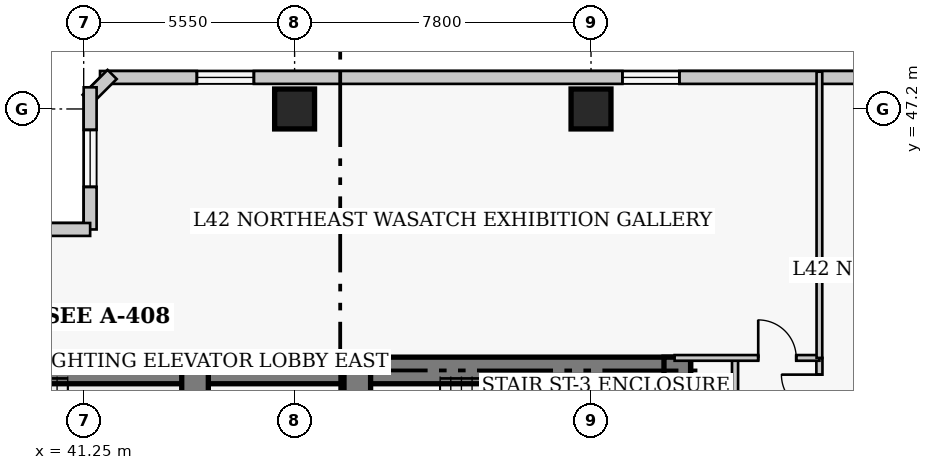
"""IFC4 building model, lengths in metres.
Left out: names, types, materials, properties, quantities, classifications, styles, units other than length and angle.
Written with IfcOpenShell. Run it as: python <this file> out.ifc"""

import sys

from ifc_helpers import new_model, si_unit, direction, frame, frame_2d, origin, origin_2d, place, context, subcontext, project, spatial, rectangle, extrude, element, fill, save


model = new_model("IFC4")
c1 = context("Model", 3, precision=1e-05, world=origin(), true_north=direction((0.0, 1.0)))
c2 = subcontext(c1, "Body", "Model", "MODEL_VIEW")
j1 = project(units=[si_unit("LENGTHUNIT", "METRE"), si_unit("PLANEANGLEUNIT", "RADIAN")], contexts=[c1])
p1 = place(None, origin())
s1 = spatial("IfcSite", under=j1, at=p1, CompositionType="ELEMENT")
p2 = place(p1, origin())
s2 = spatial("IfcBuilding", under=s1, at=p2, CompositionType="ELEMENT")
p3 = place(p2, frame((0.0, 0.0, 168.8)))
s3 = spatial("IfcBuildingStorey", under=s2, at=p3, CompositionType="ELEMENT", Elevation=168.8)
p4 = place(p3, frame((35.85, 40.32, 0.0), z_axis=(0.0, 0.0, 1.0), x_axis=(1.0, 0.0, 0.0)))
e1 = element("IfcWall", 1, at=p4, inside=s3, PredefinedType="SHEAR", context=c2, shape_type="SweptSolid", body=[
    extrude(rectangle(XDim=12.6, YDim=0.7, at=frame_2d((6.3, 0.0))), origin(), (0.0, 0.0, 1.0), 3.8),
])
p5 = place(p3, frame((48.45, 40.32, 0.0), z_axis=(0.0, 0.0, 1.0), x_axis=(1.0, 0.0, 0.0)))
e2 = element("IfcWall", 2, at=p5, inside=s3, PredefinedType="SHEAR", context=c2, shape_type="SweptSolid", body=[
    extrude(rectangle(XDim=8.77, YDim=0.7, at=frame_2d((4.385, 0.0))), origin(), (0.0, 0.0, 1.0), 3.8),
])
p6 = place(p3, frame((56.87, 27.05, 0.0), z_axis=(0.0, 0.0, 1.0), x_axis=(0.0, 1.0, 0.0)))
e3 = element("IfcWall", 3, at=p6, inside=s3, PredefinedType="SHEAR", context=c2, shape_type="SweptSolid", body=[
    extrude(rectangle(XDim=13.62, YDim=0.7, at=frame_2d((6.81, 0.0))), origin(), (0.0, 0.0, 1.0), 3.8),
])
p7 = place(p3, frame((44.18, 36.37, 0.0), z_axis=(0.0, 0.0, 1.0), x_axis=(0.0, 1.0, 0.0)))
e4 = element("IfcWall", 4, at=p7, inside=s3, PredefinedType="SHEAR", context=c2, shape_type="SweptSolid", body=[
    extrude(rectangle(XDim=3.95, YDim=0.7, at=frame_2d((1.975, 0.0))), origin(), (0.0, 0.0, 1.0), 3.8),
])
p8 = place(p3, frame((48.45, 32.4, 0.0), z_axis=(0.0, 0.0, 1.0), x_axis=(0.0, 1.0, 0.0)))
e5 = element("IfcWall", 5, at=p8, inside=s3, PredefinedType="SHEAR", context=c2, shape_type="SweptSolid", body=[
    extrude(rectangle(XDim=7.92, YDim=0.7, at=frame_2d((3.96, 0.0))), origin(), (0.0, 0.0, 1.0), 3.8),
])
p9 = place(p8, frame((5.8, 0.0, 0.0)))
e6 = element("IfcOpeningElement", 6, at=p9, cuts=e5, PredefinedType="OPENING", context=c2, shape_type="SweptSolid", body=[
    extrude(rectangle(XDim=1.1, YDim=2.15, at=frame_2d((0.55, 1.075))), frame((0.0, 0.36, 0.0), z_axis=(0.0, -1.0, 0.0), x_axis=(1.0, 0.0, 0.0)), (0.0, 0.0, 1.0), 0.72),
])
for number, where, z_axis, x_axis in (
    (7, (46.8, 47.2, 0.0), (0.0, 0.0, 1.0), (1.0, 0.0, 0.0)),
    (8, (54.6, 47.2, 0.0), (0.0, 0.0, 1.0), (1.0, 0.0, 0.0)),
):
    element("IfcColumn", number, at=place(p3, frame(where, z_axis=z_axis, x_axis=x_axis)), inside=s3, PredefinedType="COLUMN", context=c2, shape_type="SweptSolid", body=[
        extrude(rectangle(XDim=1.05, YDim=1.05, at=origin_2d()), origin(), (0.0, 0.0, 1.0), 3.8),
    ])
p10 = place(p3, frame((68.37, 48.03, 0.0), z_axis=(0.0, 0.0, 1.0), x_axis=(-1.0, 0.0, 0.0)))
e9 = element("IfcWall", 9, at=p10, inside=s3, PredefinedType="SOLIDWALL", context=c2, shape_type="SweptSolid", body=[
    extrude(rectangle(XDim=26.69, YDim=0.34, at=frame_2d((13.345, 0.0))), origin(), (0.0, 0.0, 1.0), 3.55),
])
p11 = place(p10, frame((3.048, 0.0, 0.85)))
e10 = element("IfcOpeningElement", 10, at=p11, cuts=e9, PredefinedType="OPENING", context=c2, shape_type="SweptSolid", body=[
    extrude(rectangle(XDim=1.5, YDim=1.75, at=frame_2d((0.75, 0.875))), frame((0.0, 0.18, 0.0), z_axis=(0.0, -1.0, 0.0), x_axis=(1.0, 0.0, 0.0)), (0.0, 0.0, 1.0), 0.36),
])
p12 = place(p10, frame((11.445, 0.0, 0.85)))
e11 = element("IfcOpeningElement", 11, at=p12, cuts=e9, PredefinedType="OPENING", context=c2, shape_type="SweptSolid", body=[
    extrude(rectangle(XDim=1.5, YDim=1.75, at=frame_2d((0.75, 0.875))), frame((0.0, 0.18, 0.0), z_axis=(0.0, -1.0, 0.0), x_axis=(1.0, 0.0, 0.0)), (0.0, 0.0, 1.0), 0.36),
])
p13 = place(p10, frame((22.642, 0.0, 0.85)))
e12 = element("IfcOpeningElement", 12, at=p13, cuts=e9, PredefinedType="OPENING", context=c2, shape_type="SweptSolid", body=[
    extrude(rectangle(XDim=1.5, YDim=1.75, at=frame_2d((0.75, 0.875))), frame((0.0, 0.18, 0.0), z_axis=(0.0, -1.0, 0.0), x_axis=(1.0, 0.0, 0.0)), (0.0, 0.0, 1.0), 0.36),
])
p14 = place(p3, frame((41.999, 48.108, 0.0), z_axis=(0.0, 0.0, 1.0), x_axis=(-0.707106781187, -0.707106781187, 0.0)))
e13 = element("IfcWall", 13, at=p14, inside=s3, PredefinedType="SOLIDWALL", context=c2, shape_type="SweptSolid", body=[
    extrude(rectangle(XDim=0.929, YDim=0.34, at=frame_2d((0.464, 0.0))), origin(), (0.0, 0.0, 1.0), 3.55),
])
p15 = place(p3, frame((41.42, 47.77, 0.0), z_axis=(0.0, 0.0, 1.0), x_axis=(0.0, -1.0, 0.0)))
e14 = element("IfcWall", 14, at=p15, inside=s3, PredefinedType="SOLIDWALL", context=c2, shape_type="SweptSolid", body=[
    extrude(rectangle(XDim=3.74, YDim=0.34, at=frame_2d((1.87, 0.0))), origin(), (0.0, 0.0, 1.0), 3.55),
])
p16 = place(p15, frame((1.12, 0.0, 0.85)))
e15 = element("IfcOpeningElement", 15, at=p16, cuts=e14, PredefinedType="OPENING", context=c2, shape_type="SweptSolid", body=[
    extrude(rectangle(XDim=1.5, YDim=1.75, at=frame_2d((0.75, 0.875))), frame((0.0, 0.18, 0.0), z_axis=(0.0, -1.0, 0.0), x_axis=(1.0, 0.0, 0.0)), (0.0, 0.0, 1.0), 0.36),
])
p17 = place(p3, frame((41.42, 44.03, 0.0), z_axis=(0.0, 0.0, 1.0), x_axis=(-1.0, 0.0, 0.0)))
e16 = element("IfcWall", 16, at=p17, inside=s3, PredefinedType="SOLIDWALL", context=c2, shape_type="SweptSolid", body=[
    extrude(rectangle(XDim=4.84, YDim=0.34, at=frame_2d((2.42, 0.0))), origin(), (0.0, 0.0, 1.0), 3.55),
])
p18 = place(p17, frame((1.67, 0.0, 0.85)))
e17 = element("IfcOpeningElement", 17, at=p18, cuts=e16, PredefinedType="OPENING", context=c2, shape_type="SweptSolid", body=[
    extrude(rectangle(XDim=1.5, YDim=1.75, at=frame_2d((0.75, 0.875))), frame((0.0, 0.18, 0.0), z_axis=(0.0, -1.0, 0.0), x_axis=(1.0, 0.0, 0.0)), (0.0, 0.0, 1.0), 0.36),
])
p19 = place(p3, frame((60.61, 12.05, 0.0), z_axis=(0.0, 0.0, 1.0), x_axis=(0.0, 1.0, 0.0)))
e18 = element("IfcWall", 18, at=p19, inside=s3, PredefinedType="PARTITIONING", context=c2, shape_type="SweptSolid", body=[
    extrude(rectangle(XDim=28.6, YDim=0.16, at=frame_2d((14.3, 0.0))), origin(), (0.0, 0.0, 1.0), 3.55),
])
p20 = place(p19, frame((3.5, 0.0, 0.0)))
e19 = element("IfcOpeningElement", 19, at=p20, cuts=e18, PredefinedType="OPENING", context=c2, shape_type="SweptSolid", body=[
    extrude(rectangle(XDim=0.95, YDim=2.1, at=frame_2d((0.475, 1.05))), frame((0.0, 0.09, 0.0), z_axis=(0.0, -1.0, 0.0), x_axis=(1.0, 0.0, 0.0)), (0.0, 0.0, 1.0), 0.18),
])
p21 = place(p19, frame((11.875, 0.0, 0.0)))
e20 = element("IfcOpeningElement", 20, at=p21, cuts=e18, PredefinedType="OPENING", context=c2, shape_type="SweptSolid", body=[
    extrude(rectangle(XDim=0.95, YDim=2.1, at=frame_2d((0.475, 1.05))), frame((0.0, 0.09, 0.0), z_axis=(0.0, -1.0, 0.0), x_axis=(1.0, 0.0, 0.0)), (0.0, 0.0, 1.0), 0.18),
])
p22 = place(p19, frame((20.325, 0.0, 0.0)))
e21 = element("IfcOpeningElement", 21, at=p22, cuts=e18, PredefinedType="OPENING", context=c2, shape_type="SweptSolid", body=[
    extrude(rectangle(XDim=0.95, YDim=2.1, at=frame_2d((0.475, 1.05))), frame((0.0, 0.09, 0.0), z_axis=(0.0, -1.0, 0.0), x_axis=(1.0, 0.0, 0.0)), (0.0, 0.0, 1.0), 0.18),
])
p23 = place(p19, frame((27.16, 0.0, 0.0)))
e22 = element("IfcOpeningElement", 22, at=p23, cuts=e18, PredefinedType="OPENING", context=c2, shape_type="SweptSolid", body=[
    extrude(rectangle(XDim=1.0, YDim=2.15, at=frame_2d((0.5, 1.075))), frame((0.0, 0.09, 0.0), z_axis=(0.0, -1.0, 0.0), x_axis=(1.0, 0.0, 0.0)), (0.0, 0.0, 1.0), 0.18),
])
p24 = place(p3, frame((58.39, 16.51, 0.0), z_axis=(0.0, 0.0, 1.0), x_axis=(0.0, 1.0, 0.0)))
e23 = element("IfcWall", 23, at=p24, inside=s3, PredefinedType="PARTITIONING", context=c2, shape_type="SweptSolid", body=[
    extrude(rectangle(XDim=24.14, YDim=0.16, at=frame_2d((12.07, 0.0))), origin(), (0.0, 0.0, 1.0), 3.093),
])
p25 = place(p3, frame((56.8, 40.65, 0.0), z_axis=(0.0, 0.0, 1.0), x_axis=(1.0, 0.0, 0.0)))
e24 = element("IfcWall", 24, at=p25, inside=s3, PredefinedType="PARTITIONING", context=c2, shape_type="SweptSolid", body=[
    extrude(rectangle(XDim=3.81, YDim=0.15, at=frame_2d((1.905, 0.0))), origin(), (0.0, 0.0, 1.0), 3.55),
])
p26 = place(p25, frame((2.2, 0.0, 0.0)))
e25 = element("IfcOpeningElement", 25, at=p26, cuts=e24, PredefinedType="OPENING", context=c2, shape_type="SweptSolid", body=[
    extrude(rectangle(XDim=1.0, YDim=2.15, at=frame_2d((0.5, 1.075))), frame((0.0, 0.085, 0.0), z_axis=(0.0, -1.0, 0.0), x_axis=(1.0, 0.0, 0.0)), (0.0, 0.0, 1.0), 0.17),
])
p27 = place(p3, frame((60.61, 40.65, 0.0), z_axis=(0.0, 0.0, 1.0), x_axis=(0.0, 1.0, 0.0)))
e26 = element("IfcWall", 26, at=p27, inside=s3, PredefinedType="PARTITIONING", context=c2, shape_type="SweptSolid", body=[
    extrude(rectangle(XDim=7.53, YDim=0.15, at=frame_2d((3.765, 0.0))), origin(), (0.0, 0.0, 1.0), 3.55),
])
p28 = place(p12, origin())
e27 = element("IfcWindow", 27, at=p28, inside=s3, PartitioningType="SINGLE_PANEL", PredefinedType="WINDOW", context=c2, shape_type="SweptSolid", body=[
    extrude(rectangle(XDim=1.5, YDim=1.75, at=frame_2d((0.75, 0.875))), frame((0.0, 0.03, 0.0), z_axis=(0.0, -1.0, 0.0), x_axis=(1.0, 0.0, 0.0)), (0.0, 0.0, 1.0), 0.06),
])
fill(e11, e27)
p29 = place(p13, origin())
e28 = element("IfcWindow", 28, at=p29, inside=s3, PartitioningType="SINGLE_PANEL", PredefinedType="WINDOW", context=c2, shape_type="SweptSolid", body=[
    extrude(rectangle(XDim=1.5, YDim=1.75, at=frame_2d((0.75, 0.875))), frame((0.0, 0.03, 0.0), z_axis=(0.0, -1.0, 0.0), x_axis=(1.0, 0.0, 0.0)), (0.0, 0.0, 1.0), 0.06),
])
fill(e12, e28)
p30 = place(p16, origin())
e29 = element("IfcWindow", 29, at=p30, inside=s3, PartitioningType="SINGLE_PANEL", PredefinedType="WINDOW", context=c2, shape_type="SweptSolid", body=[
    extrude(rectangle(XDim=1.5, YDim=1.75, at=frame_2d((0.75, 0.875))), frame((0.0, 0.03, 0.0), z_axis=(0.0, -1.0, 0.0), x_axis=(1.0, 0.0, 0.0)), (0.0, 0.0, 1.0), 0.06),
])
fill(e15, e29)
p31 = place(p26, origin())
e30 = element("IfcDoor", 30, at=p31, inside=s3, OperationType="SINGLE_SWING_LEFT", PredefinedType="DOOR", context=c2, shape_type="SweptSolid", body=[
    extrude(rectangle(XDim=1.0, YDim=2.15, at=frame_2d((0.5, 1.075))), frame((0.0, 0.025, 0.0), z_axis=(0.0, -1.0, 0.0), x_axis=(1.0, 0.0, 0.0)), (0.0, 0.0, 1.0), 0.05),
])
fill(e25, e30)
p32 = place(p23, origin())
e31 = element("IfcDoor", 31, at=p32, inside=s3, OperationType="SINGLE_SWING_RIGHT", PredefinedType="DOOR", context=c2, shape_type="SweptSolid", body=[
    extrude(rectangle(XDim=1.0, YDim=2.15, at=frame_2d((0.5, 1.075))), frame((0.0, 0.025, 0.0), z_axis=(0.0, -1.0, 0.0), x_axis=(1.0, 0.0, 0.0)), (0.0, 0.0, 1.0), 0.05),
])
fill(e22, e31)
save(model, sys.argv[1])
